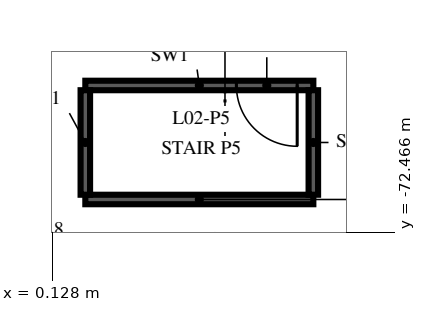
"""IFC4 building model, lengths in metres.
Left out: names, types, materials, properties, quantities, classifications, styles, units other than length and angle.
Written with IfcOpenShell. Run it as: python <this file> out.ifc"""

import sys

from ifc_helpers import new_model, si_unit, direction, frame, frame_2d, origin, place, context, subcontext, project, spatial, rectangle, extrude, element, fill, save


model = new_model("IFC4")
c1 = context("Model", 3, precision=1e-05, world=origin(), true_north=direction((0.0, 1.0)))
c2 = subcontext(c1, "Body", "Model", "MODEL_VIEW")
j1 = project(units=[si_unit("LENGTHUNIT", "METRE"), si_unit("PLANEANGLEUNIT", "RADIAN")], contexts=[c1])
p1 = place(None, origin())
s1 = spatial("IfcSite", under=j1, at=p1, CompositionType="ELEMENT")
p2 = place(p1, origin())
s2 = spatial("IfcBuilding", under=s1, at=p2, CompositionType="ELEMENT")
p3 = place(p2, frame((0.0, 0.0, 12.0)))
s3 = spatial("IfcBuildingStorey", under=s2, at=p3, CompositionType="ELEMENT", Elevation=12.0)
p4 = place(p3, frame((1.0, -71.6, 0.0), z_axis=(0.0, 0.0, 1.0), x_axis=(1.0, 0.0, 0.0)))
e1 = element("IfcWall", 1, at=p4, inside=s3, PredefinedType="SOLIDWALL", context=c2, shape_type="SweptSolid", body=[
    extrude(rectangle(XDim=6.0, YDim=0.25, at=frame_2d((3.0, 0.0))), origin(), (0.0, 0.0, 1.0), 7.0),
])
p5 = place(p3, frame((7.0, -68.6, 0.0), z_axis=(0.0, 0.0, 1.0), x_axis=(-1.0, 0.0, 0.0)))
e2 = element("IfcWall", 2, at=p5, inside=s3, PredefinedType="SOLIDWALL", context=c2, shape_type="SweptSolid", body=[
    extrude(rectangle(XDim=6.0, YDim=0.25, at=frame_2d((3.0, 0.0))), origin(), (0.0, 0.0, 1.0), 7.0),
])
p6 = place(p5, frame((0.425, 0.0, 0.0)))
e3 = element("IfcOpeningElement", 3, at=p6, cuts=e2, PredefinedType="OPENING", context=c2, shape_type="SweptSolid", body=[
    extrude(rectangle(XDim=1.6, YDim=2.1, at=frame_2d((0.8, 1.05))), frame((0.0, 0.14, 0.0), z_axis=(0.0, -1.0, 0.0), x_axis=(1.0, 0.0, 0.0)), (0.0, 0.0, 1.0), 0.28),
])
for number, where, z_axis, x_axis in (
    (4, (7.0, -71.475, 0.0), (0.0, 0.0, 1.0), (0.0, 1.0, 0.0)),
    (5, (1.0, -68.725, 0.0), (0.0, 0.0, 1.0), (0.0, -1.0, 0.0)),
):
    element("IfcWall", number, at=place(p3, frame(where, z_axis=z_axis, x_axis=x_axis)), inside=s3, PredefinedType="SOLIDWALL", context=c2, shape_type="SweptSolid", body=[
        extrude(rectangle(XDim=2.75, YDim=0.25, at=frame_2d((1.375, 0.0))), origin(), (0.0, 0.0, 1.0), 7.0),
    ])
p7 = place(p6, origin())
e6 = element("IfcDoor", 6, at=p7, inside=s3, OperationType="DOUBLE_DOOR_SINGLE_SWING", PredefinedType="DOOR", context=c2, shape_type="SweptSolid", body=[
    extrude(rectangle(XDim=1.6, YDim=2.1, at=frame_2d((0.8, 1.05))), frame((0.0, 0.125, 0.0), z_axis=(0.0, -1.0, 0.0), x_axis=(1.0, 0.0, 0.0)), (0.0, 0.0, 1.0), 0.25),
])
fill(e3, e6)
save(model, sys.argv[1])
